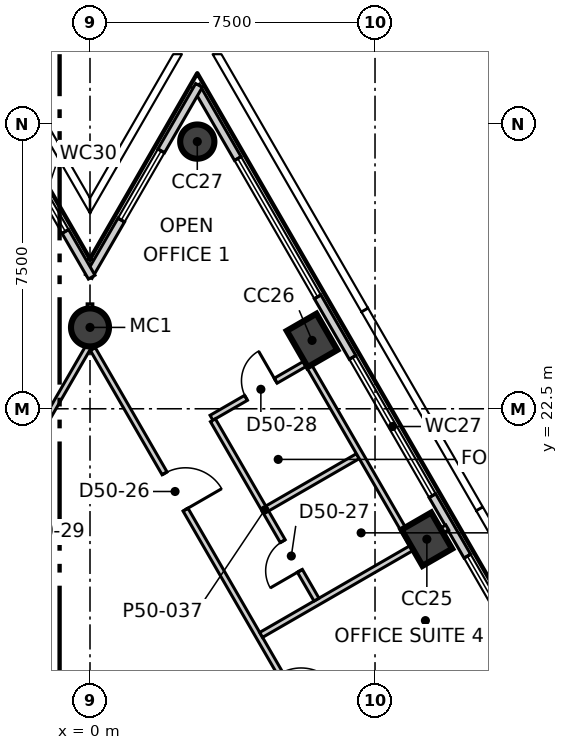
"""IFC4 building model, lengths in metres.
Left out: names, types, materials, properties, quantities, classifications, styles, units other than length and angle.
Written with IfcOpenShell. Run it as: python <this file> out.ifc"""

import sys

from ifc_helpers import new_model, si_unit, direction, frame, frame_2d, origin, origin_2d, place, context, subcontext, project, spatial, rectangle, circle, extrude, element, fill, save


model = new_model("IFC4")
c1 = context("Model", 3, precision=1e-05, world=origin(), true_north=direction((0.0, 1.0)))
c2 = subcontext(c1, "Body", "Model", "MODEL_VIEW")
j1 = project(units=[si_unit("LENGTHUNIT", "METRE"), si_unit("PLANEANGLEUNIT", "RADIAN")], contexts=[c1])
p1 = place(None, origin())
s1 = spatial("IfcSite", under=j1, at=p1, CompositionType="ELEMENT")
p2 = place(p1, origin())
s2 = spatial("IfcBuilding", under=s1, at=p2, CompositionType="ELEMENT")
p3 = place(p2, frame((0.0, 0.0, 215.3)))
s3 = spatial("IfcBuildingStorey", under=s2, at=p3, CompositionType="ELEMENT", Elevation=215.3)
for number, where, z_axis, x_axis in (
    (1, (8.864, 19.068, -0.3), (0.0, 0.0, 1.0), (-0.5, 0.866, 0.0)),
    (2, (5.843, 24.299, -0.3), (0.0, 0.0, 1.0), (-0.5, 0.866, 0.0)),
):
    element("IfcColumn", number, at=place(p3, frame(where, z_axis=z_axis, x_axis=x_axis)), inside=s3, PredefinedType="COLUMN", context=c2, shape_type="SweptSolid", body=[
        extrude(rectangle(XDim=1.1, YDim=0.9, at=origin_2d()), origin(), (0.0, 0.0, 1.0), 4.0),
    ])
p4 = place(p3, frame((2.823, 29.53, -0.3), z_axis=(0.0, 0.0, 1.0), x_axis=(-0.5, 0.866025403784, 0.0)))
e3 = element("IfcColumn", 3, at=p4, inside=s3, PredefinedType="COLUMN", context=c2, shape_type="SweptSolid", body=[
    extrude(circle(Radius=0.45, at=origin_2d()), origin(), (0.0, 0.0, 1.0), 4.0),
])
p5 = place(p3, frame((0.0, 24.641, -0.3), z_axis=(0.0, 0.0, 1.0), x_axis=(1.0, 0.0, 0.0)))
e4 = element("IfcColumn", 4, at=p5, inside=s3, PredefinedType="COLUMN", context=c2, shape_type="SweptSolid", body=[
    extrude(circle(Radius=0.5, at=origin_2d()), origin(), (0.0, 0.0, 1.0), 4.0),
])
p6 = place(p3, frame((28.243, -13.098, 0.0), z_axis=(0.0, 0.0, 1.0), x_axis=(-0.500001688958, 0.866024428662, 0.0)))
e5 = element("IfcWall", 5, at=p6, inside=s3, PredefinedType="ELEMENTEDWALL", context=c2, shape_type="SweptSolid", body=[
    extrude(rectangle(XDim=50.909, YDim=0.2, at=frame_2d((25.455, 0.0))), origin(), (0.0, 0.0, 1.0), 3.7),
])
p7 = place(p6, frame((2.223, 0.0, 0.9)))
e6 = element("IfcOpeningElement", 6, at=p7, cuts=e5, PredefinedType="OPENING", context=c2, shape_type="SweptSolid", body=[
    extrude(rectangle(XDim=4.2, YDim=2.5, at=frame_2d((2.1, 1.25))), frame((0.0, 0.11, 0.0), z_axis=(0.0, -1.0, 0.0), x_axis=(1.0, 0.0, 0.0)), (0.0, 0.0, 1.0), 0.22),
])
p8 = place(p6, frame((8.263, 0.0, 0.9)))
e7 = element("IfcOpeningElement", 7, at=p8, cuts=e5, PredefinedType="OPENING", context=c2, shape_type="SweptSolid", body=[
    extrude(rectangle(XDim=4.2, YDim=2.5, at=frame_2d((2.1, 1.25))), frame((0.0, 0.11, 0.0), z_axis=(0.0, -1.0, 0.0), x_axis=(1.0, 0.0, 0.0)), (0.0, 0.0, 1.0), 0.22),
])
p9 = place(p6, frame((14.304, 0.0, 0.9)))
e8 = element("IfcOpeningElement", 8, at=p9, cuts=e5, PredefinedType="OPENING", context=c2, shape_type="SweptSolid", body=[
    extrude(rectangle(XDim=4.2, YDim=2.5, at=frame_2d((2.1, 1.25))), frame((0.0, 0.11, 0.0), z_axis=(0.0, -1.0, 0.0), x_axis=(1.0, 0.0, 0.0)), (0.0, 0.0, 1.0), 0.22),
])
p10 = place(p6, frame((20.345, 0.0, 0.9)))
e9 = element("IfcOpeningElement", 9, at=p10, cuts=e5, PredefinedType="OPENING", context=c2, shape_type="SweptSolid", body=[
    extrude(rectangle(XDim=4.2, YDim=2.5, at=frame_2d((2.1, 1.25))), frame((0.0, 0.11, 0.0), z_axis=(0.0, -1.0, 0.0), x_axis=(1.0, 0.0, 0.0)), (0.0, 0.0, 1.0), 0.22),
])
p11 = place(p6, frame((26.385, 0.0, 0.9)))
e10 = element("IfcOpeningElement", 10, at=p11, cuts=e5, PredefinedType="OPENING", context=c2, shape_type="SweptSolid", body=[
    extrude(rectangle(XDim=4.2, YDim=2.5, at=frame_2d((2.1, 1.25))), frame((0.0, 0.11, 0.0), z_axis=(0.0, -1.0, 0.0), x_axis=(1.0, 0.0, 0.0)), (0.0, 0.0, 1.0), 0.22),
])
p12 = place(p6, frame((32.426, 0.0, 0.9)))
e11 = element("IfcOpeningElement", 11, at=p12, cuts=e5, PredefinedType="OPENING", context=c2, shape_type="SweptSolid", body=[
    extrude(rectangle(XDim=4.2, YDim=2.5, at=frame_2d((2.1, 1.25))), frame((0.0, 0.11, 0.0), z_axis=(0.0, -1.0, 0.0), x_axis=(1.0, 0.0, 0.0)), (0.0, 0.0, 1.0), 0.22),
])
p13 = place(p6, frame((38.466, 0.0, 0.9)))
e12 = element("IfcOpeningElement", 12, at=p13, cuts=e5, PredefinedType="OPENING", context=c2, shape_type="SweptSolid", body=[
    extrude(rectangle(XDim=4.2, YDim=2.5, at=frame_2d((2.1, 1.25))), frame((0.0, 0.11, 0.0), z_axis=(0.0, -1.0, 0.0), x_axis=(1.0, 0.0, 0.0)), (0.0, 0.0, 1.0), 0.22),
])
p14 = place(p6, frame((44.507, 0.0, 0.9)))
e13 = element("IfcOpeningElement", 13, at=p14, cuts=e5, PredefinedType="OPENING", context=c2, shape_type="SweptSolid", body=[
    extrude(rectangle(XDim=4.2, YDim=2.5, at=frame_2d((2.1, 1.25))), frame((0.0, 0.11, 0.0), z_axis=(0.0, -1.0, 0.0), x_axis=(1.0, 0.0, 0.0)), (0.0, 0.0, 1.0), 0.22),
])
p15 = place(p3, frame((2.868, 31.008, 0.0), z_axis=(0.0, 0.0, 1.0), x_axis=(-0.499983322773, -0.866035032172, 0.0)))
e14 = element("IfcWall", 14, at=p15, inside=s3, PredefinedType="ELEMENTEDWALL", context=c2, shape_type="SweptSolid", body=[
    extrude(rectangle(XDim=5.806, YDim=0.2, at=frame_2d((2.903, 0.0))), origin(), (0.0, 0.0, 1.0), 3.7),
])
p16 = place(p15, frame((1.99, 0.0, 0.9)))
e15 = element("IfcOpeningElement", 15, at=p16, cuts=e14, PredefinedType="OPENING", context=c2, shape_type="SweptSolid", body=[
    extrude(rectangle(XDim=2.1, YDim=2.5, at=frame_2d((1.05, 1.25))), frame((0.0, 0.11, 0.0), z_axis=(0.0, -1.0, 0.0), x_axis=(1.0, 0.0, 0.0)), (0.0, 0.0, 1.0), 0.22),
])
p17 = place(p3, frame((0.045, 25.963, 0.0), z_axis=(0.0, 0.0, 1.0), x_axis=(-0.499983322773, 0.866035032172, 0.0)))
e16 = element("IfcWall", 16, at=p17, inside=s3, PredefinedType="ELEMENTEDWALL", context=c2, shape_type="SweptSolid", body=[
    extrude(rectangle(XDim=5.806, YDim=0.2, at=frame_2d((2.903, 0.0))), origin(), (0.0, 0.0, 1.0), 3.7),
])
p18 = place(p17, frame((1.39, 0.0, 0.9)))
e17 = element("IfcOpeningElement", 17, at=p18, cuts=e16, PredefinedType="OPENING", context=c2, shape_type="SweptSolid", body=[
    extrude(rectangle(XDim=2.1, YDim=2.5, at=frame_2d((1.05, 1.25))), frame((0.0, 0.11, 0.0), z_axis=(0.0, -1.0, 0.0), x_axis=(1.0, 0.0, 0.0)), (0.0, 0.0, 1.0), 0.22),
])
p19 = place(p3, frame((-20.883, -11.97, 0.0), z_axis=(0.0, 0.0, 1.0), x_axis=(0.500006150555, 0.866021852731, 0.0)))
e18 = element("IfcWall", 18, at=p19, inside=s3, PredefinedType="PARTITIONING", context=c2, shape_type="SweptSolid", body=[
    extrude(rectangle(XDim=41.766, YDim=0.15, at=frame_2d((20.883, 0.0))), origin(), (0.0, 0.0, 1.0), 3.7),
])
p20 = place(p19, frame((36.816, 0.0, 0.0)))
e19 = element("IfcOpeningElement", 19, at=p20, cuts=e18, PredefinedType="OPENING", context=c2, shape_type="SweptSolid", body=[
    extrude(rectangle(XDim=1.1, YDim=2.1, at=frame_2d((0.55, 1.05))), frame((0.0, 0.085, 0.0), z_axis=(0.0, -1.0, 0.0), x_axis=(1.0, 0.0, 0.0)), (0.0, 0.0, 1.0), 0.17),
])
p21 = place(p19, frame((23.939, 0.0, 0.0)))
e20 = element("IfcOpeningElement", 20, at=p21, cuts=e18, PredefinedType="OPENING", context=c2, shape_type="SweptSolid", body=[
    extrude(rectangle(XDim=1.1, YDim=2.1, at=frame_2d((0.55, 1.05))), frame((0.0, 0.085, 0.0), z_axis=(0.0, -1.0, 0.0), x_axis=(1.0, 0.0, 0.0)), (0.0, 0.0, 1.0), 0.17),
])
p22 = place(p19, frame((31.139, 0.0, 0.0)))
e21 = element("IfcOpeningElement", 21, at=p22, cuts=e18, PredefinedType="OPENING", context=c2, shape_type="SweptSolid", body=[
    extrude(rectangle(XDim=0.9, YDim=2.1, at=frame_2d((0.45, 1.05))), frame((0.0, 0.085, 0.0), z_axis=(0.0, -1.0, 0.0), x_axis=(1.0, 0.0, 0.0)), (0.0, 0.0, 1.0), 0.17),
])
p23 = place(p19, frame((28.739, 0.0, 0.0)))
e22 = element("IfcOpeningElement", 22, at=p23, cuts=e18, PredefinedType="OPENING", context=c2, shape_type="SweptSolid", body=[
    extrude(rectangle(XDim=0.9, YDim=2.1, at=frame_2d((0.45, 1.05))), frame((0.0, 0.085, 0.0), z_axis=(0.0, -1.0, 0.0), x_axis=(1.0, 0.0, 0.0)), (0.0, 0.0, 1.0), 0.17),
])
p24 = place(p19, frame((14.258, 0.0, 0.0)))
e23 = element("IfcOpeningElement", 23, at=p24, cuts=e18, PredefinedType="OPENING", context=c2, shape_type="SweptSolid", body=[
    extrude(rectangle(XDim=1.1, YDim=2.1, at=frame_2d((0.55, 1.05))), frame((0.0, 0.085, 0.0), z_axis=(0.0, -1.0, 0.0), x_axis=(1.0, 0.0, 0.0)), (0.0, 0.0, 1.0), 0.17),
])
p25 = place(p19, frame((3.777, 0.0, 0.0)))
e24 = element("IfcOpeningElement", 24, at=p25, cuts=e18, PredefinedType="OPENING", context=c2, shape_type="SweptSolid", body=[
    extrude(rectangle(XDim=1.1, YDim=2.1, at=frame_2d((0.55, 1.05))), frame((0.0, 0.085, 0.0), z_axis=(0.0, -1.0, 0.0), x_axis=(1.0, 0.0, 0.0)), (0.0, 0.0, 1.0), 0.17),
])
p26 = place(p3, frame((0.0, 24.35, 0.0), z_axis=(0.0, 0.0, 1.0), x_axis=(0.0, 1.0, 0.0)))
e25 = element("IfcWall", 25, at=p26, inside=s3, PredefinedType="PARTITIONING", context=c2, shape_type="SweptSolid", body=[
    extrude(rectangle(XDim=0.911, YDim=0.15, at=frame_2d((0.456, 0.0))), origin(), (0.0, 0.0, 1.0), 3.7),
])
p27 = place(p3, frame((0.075, 24.07, 0.0), z_axis=(0.0, 0.0, 1.0), x_axis=(0.500006834213, -0.866021458014, 0.0)))
e26 = element("IfcWall", 26, at=p27, inside=s3, PredefinedType="PARTITIONING", context=c2, shape_type="SweptSolid", body=[
    extrude(rectangle(XDim=41.616, YDim=0.15, at=frame_2d((20.808, 0.0))), origin(), (0.0, 0.0, 1.0), 3.7),
])
p28 = place(p27, frame((33.715, 0.0, 0.0)))
e27 = element("IfcOpeningElement", 27, at=p28, cuts=e26, PredefinedType="OPENING", context=c2, shape_type="SweptSolid", body=[
    extrude(rectangle(XDim=1.1, YDim=2.1, at=frame_2d((0.55, 1.05))), frame((0.0, 0.085, 0.0), z_axis=(0.0, -1.0, 0.0), x_axis=(1.0, 0.0, 0.0)), (0.0, 0.0, 1.0), 0.17),
])
p29 = place(p27, frame((22.098, 0.0, 0.0)))
e28 = element("IfcOpeningElement", 28, at=p29, cuts=e26, PredefinedType="OPENING", context=c2, shape_type="SweptSolid", body=[
    extrude(rectangle(XDim=1.0, YDim=2.1, at=frame_2d((0.5, 1.05))), frame((0.0, 0.085, 0.0), z_axis=(0.0, -1.0, 0.0), x_axis=(1.0, 0.0, 0.0)), (0.0, 0.0, 1.0), 0.17),
])
p30 = place(p27, frame((25.198, 0.0, 0.0)))
e29 = element("IfcOpeningElement", 29, at=p30, cuts=e26, PredefinedType="OPENING", context=c2, shape_type="SweptSolid", body=[
    extrude(rectangle(XDim=0.9, YDim=2.1, at=frame_2d((0.45, 1.05))), frame((0.0, 0.085, 0.0), z_axis=(0.0, -1.0, 0.0), x_axis=(1.0, 0.0, 0.0)), (0.0, 0.0, 1.0), 0.17),
])
p31 = place(p27, frame((9.858, 0.0, 0.0)))
e30 = element("IfcOpeningElement", 30, at=p31, cuts=e26, PredefinedType="OPENING", context=c2, shape_type="SweptSolid", body=[
    extrude(rectangle(XDim=1.1, YDim=2.1, at=frame_2d((0.55, 1.05))), frame((0.0, 0.085, 0.0), z_axis=(0.0, -1.0, 0.0), x_axis=(1.0, 0.0, 0.0)), (0.0, 0.0, 1.0), 0.17),
])
p32 = place(p27, frame((18.758, 0.0, 0.0)))
e31 = element("IfcOpeningElement", 31, at=p32, cuts=e26, PredefinedType="OPENING", context=c2, shape_type="SweptSolid", body=[
    extrude(rectangle(XDim=0.9, YDim=2.1, at=frame_2d((0.45, 1.05))), frame((0.0, 0.085, 0.0), z_axis=(0.0, -1.0, 0.0), x_axis=(1.0, 0.0, 0.0)), (0.0, 0.0, 1.0), 0.17),
])
p33 = place(p27, frame((15.558, 0.0, 0.0)))
e32 = element("IfcOpeningElement", 32, at=p33, cuts=e26, PredefinedType="OPENING", context=c2, shape_type="SweptSolid", body=[
    extrude(rectangle(XDim=0.9, YDim=2.1, at=frame_2d((0.45, 1.05))), frame((0.0, 0.085, 0.0), z_axis=(0.0, -1.0, 0.0), x_axis=(1.0, 0.0, 0.0)), (0.0, 0.0, 1.0), 0.17),
])
p34 = place(p27, frame((12.658, 0.0, 0.0)))
e33 = element("IfcOpeningElement", 33, at=p34, cuts=e26, PredefinedType="OPENING", context=c2, shape_type="SweptSolid", body=[
    extrude(rectangle(XDim=1.0, YDim=2.1, at=frame_2d((0.5, 1.05))), frame((0.0, 0.085, 0.0), z_axis=(0.0, -1.0, 0.0), x_axis=(1.0, 0.0, 0.0)), (0.0, 0.0, 1.0), 0.17),
])
p35 = place(p27, frame((3.776, 0.0, 0.0)))
e34 = element("IfcOpeningElement", 34, at=p35, cuts=e26, PredefinedType="OPENING", context=c2, shape_type="SweptSolid", body=[
    extrude(rectangle(XDim=1.1, YDim=2.1, at=frame_2d((0.55, 1.05))), frame((0.0, 0.085, 0.0), z_axis=(0.0, -1.0, 0.0), x_axis=(1.0, 0.0, 0.0)), (0.0, 0.0, 1.0), 0.17),
])
p36 = place(p3, frame((4.503, 16.55, 0.0), z_axis=(0.0, 0.0, 1.0), x_axis=(0.866021685936, 0.500006439447, 0.0)))
e35 = element("IfcWall", 35, at=p36, inside=s3, PredefinedType="PARTITIONING", context=c2, shape_type="SweptSolid", body=[
    extrude(rectangle(XDim=5.656, YDim=0.15, at=frame_2d((2.828, 0.0))), origin(), (0.0, 0.0, 1.0), 3.7),
])
p37 = place(p3, frame((4.662, 19.875, 0.0), z_axis=(0.0, 0.0, 1.0), x_axis=(0.865965703354, 0.500103389924, 0.0)))
e36 = element("IfcWall", 36, at=p37, inside=s3, PredefinedType="PARTITIONING", context=c2, shape_type="SweptSolid", body=[
    extrude(rectangle(XDim=2.755, YDim=0.15, at=frame_2d((1.378, 0.0))), origin(), (0.0, 0.0, 1.0), 3.7),
])
p38 = place(p3, frame((5.713, 23.715, 0.0), z_axis=(0.0, 0.0, 1.0), x_axis=(0.499931554694, -0.866064917094, 0.0)))
e37 = element("IfcWall", 37, at=p38, inside=s3, PredefinedType="PARTITIONING", context=c2, shape_type="SweptSolid", body=[
    extrude(rectangle(XDim=5.525, YDim=0.15, at=frame_2d((2.763, 0.0))), origin(), (0.0, 0.0, 1.0), 2.95),
])
p39 = place(p3, frame((3.197, 22.263, 0.0), z_axis=(0.0, 0.0, 1.0), x_axis=(0.86602612668, 0.499998747907, 0.0)))
e38 = element("IfcWall", 38, at=p39, inside=s3, PredefinedType="PARTITIONING", context=c2, shape_type="SweptSolid", body=[
    extrude(rectangle(XDim=2.83, YDim=0.15, at=frame_2d((1.415, 0.0))), origin(), (0.0, 0.0, 1.0), 3.7),
])
p40 = place(p39, frame((1.05, 0.0, 0.0)))
e39 = element("IfcOpeningElement", 39, at=p40, cuts=e38, PredefinedType="OPENING", context=c2, shape_type="SweptSolid", body=[
    extrude(rectangle(XDim=0.9, YDim=2.1, at=frame_2d((0.45, 1.05))), frame((0.0, 0.085, 0.0), z_axis=(0.0, -1.0, 0.0), x_axis=(1.0, 0.0, 0.0)), (0.0, 0.0, 1.0), 0.17),
])
p41 = place(p3, frame((3.235, 22.198, 0.0), z_axis=(0.0, 0.0, 1.0), x_axis=(0.49996933381, -0.866043108194, 0.0)))
e40 = element("IfcWall", 40, at=p41, inside=s3, PredefinedType="PARTITIONING", context=c2, shape_type="SweptSolid", body=[
    extrude(rectangle(XDim=5.45, YDim=0.15, at=frame_2d((2.725, 0.0))), origin(), (0.0, 0.0, 1.0), 3.7),
])
p42 = place(p41, frame((3.675, 0.0, 0.0)))
e41 = element("IfcOpeningElement", 41, at=p42, cuts=e40, PredefinedType="OPENING", context=c2, shape_type="SweptSolid", body=[
    extrude(rectangle(XDim=0.9, YDim=2.1, at=frame_2d((0.45, 1.05))), frame((0.0, 0.085, 0.0), z_axis=(0.0, -1.0, 0.0), x_axis=(1.0, 0.0, 0.0)), (0.0, 0.0, 1.0), 0.17),
])
p43 = place(p12, origin())
e42 = element("IfcWindow", 42, at=p43, inside=s3, PartitioningType="SINGLE_PANEL", PredefinedType="WINDOW", context=c2, shape_type="SweptSolid", body=[
    extrude(rectangle(XDim=4.2, YDim=2.5, at=frame_2d((2.1, 1.25))), frame((0.0, 0.03, 0.0), z_axis=(0.0, -1.0, 0.0), x_axis=(1.0, 0.0, 0.0)), (0.0, 0.0, 1.0), 0.06),
])
fill(e11, e42)
p44 = place(p13, origin())
e43 = element("IfcWindow", 43, at=p44, inside=s3, PartitioningType="SINGLE_PANEL", PredefinedType="WINDOW", context=c2, shape_type="SweptSolid", body=[
    extrude(rectangle(XDim=4.2, YDim=2.5, at=frame_2d((2.1, 1.25))), frame((0.0, 0.03, 0.0), z_axis=(0.0, -1.0, 0.0), x_axis=(1.0, 0.0, 0.0)), (0.0, 0.0, 1.0), 0.06),
])
fill(e12, e43)
p45 = place(p14, origin())
e44 = element("IfcWindow", 44, at=p45, inside=s3, PartitioningType="SINGLE_PANEL", PredefinedType="WINDOW", context=c2, shape_type="SweptSolid", body=[
    extrude(rectangle(XDim=4.2, YDim=2.5, at=frame_2d((2.1, 1.25))), frame((0.0, 0.03, 0.0), z_axis=(0.0, -1.0, 0.0), x_axis=(1.0, 0.0, 0.0)), (0.0, 0.0, 1.0), 0.06),
])
fill(e13, e44)
p46 = place(p16, origin())
e45 = element("IfcWindow", 45, at=p46, inside=s3, PartitioningType="SINGLE_PANEL", PredefinedType="WINDOW", context=c2, shape_type="SweptSolid", body=[
    extrude(rectangle(XDim=2.1, YDim=2.5, at=frame_2d((1.05, 1.25))), frame((0.0, 0.03, 0.0), z_axis=(0.0, -1.0, 0.0), x_axis=(1.0, 0.0, 0.0)), (0.0, 0.0, 1.0), 0.06),
])
fill(e15, e45)
p47 = place(p18, origin())
e46 = element("IfcWindow", 46, at=p47, inside=s3, PartitioningType="SINGLE_PANEL", PredefinedType="WINDOW", context=c2, shape_type="SweptSolid", body=[
    extrude(rectangle(XDim=2.1, YDim=2.5, at=frame_2d((1.05, 1.25))), frame((0.0, 0.03, 0.0), z_axis=(0.0, -1.0, 0.0), x_axis=(1.0, 0.0, 0.0)), (0.0, 0.0, 1.0), 0.06),
])
fill(e17, e46)
p48 = place(p35, origin())
e47 = element("IfcDoor", 47, at=p48, inside=s3, OperationType="SINGLE_SWING_LEFT", PredefinedType="DOOR", context=c2, shape_type="SweptSolid", body=[
    extrude(rectangle(XDim=1.1, YDim=2.1, at=frame_2d((0.55, 1.05))), frame((0.0, 0.025, 0.0), z_axis=(0.0, -1.0, 0.0), x_axis=(1.0, 0.0, 0.0)), (0.0, 0.0, 1.0), 0.05),
])
fill(e34, e47)
p49 = place(p42, origin())
e48 = element("IfcDoor", 48, at=p49, inside=s3, OperationType="SINGLE_SWING_RIGHT", PredefinedType="DOOR", context=c2, shape_type="SweptSolid", body=[
    extrude(rectangle(XDim=0.9, YDim=2.1, at=frame_2d((0.45, 1.05))), frame((0.0, 0.025, 0.0), z_axis=(0.0, -1.0, 0.0), x_axis=(1.0, 0.0, 0.0)), (0.0, 0.0, 1.0), 0.05),
])
fill(e41, e48)
p50 = place(p40, origin())
e49 = element("IfcDoor", 49, at=p50, inside=s3, OperationType="SINGLE_SWING_LEFT", PredefinedType="DOOR", context=c2, shape_type="SweptSolid", body=[
    extrude(rectangle(XDim=0.9, YDim=2.1, at=frame_2d((0.45, 1.05))), frame((0.0, 0.025, 0.0), z_axis=(0.0, -1.0, 0.0), x_axis=(1.0, 0.0, 0.0)), (0.0, 0.0, 1.0), 0.05),
])
fill(e39, e49)
save(model, sys.argv[1])
